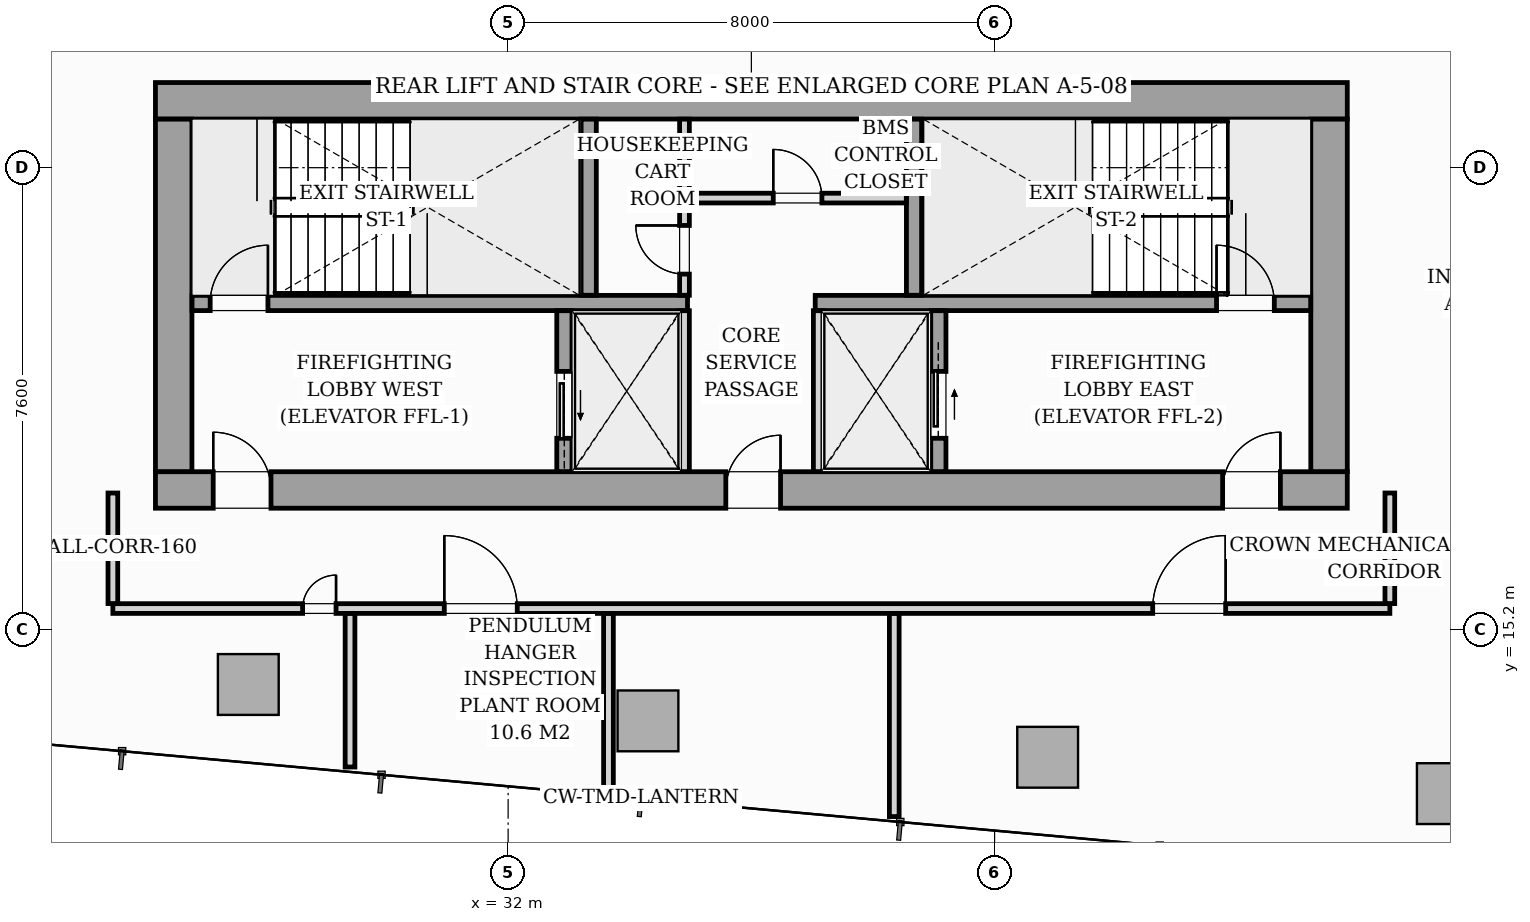
"""IFC4 building model, lengths in metres.
Left out: names, types, materials, properties, quantities, classifications, styles, units other than length and angle.
Written with IfcOpenShell. Run it as: python <this file> out.ifc"""

import sys

from ifc_helpers import new_model, si_unit, direction, frame, frame_2d, origin, origin_2d, place, context, subcontext, project, spatial, rectangle, i_section, extrude, source, transform, mapped, element, fill, save


model = new_model("IFC4")
c1 = context("Model", 3, precision=1e-05, world=origin(), true_north=direction((0.0, 1.0)))
c2 = subcontext(c1, "Body", "Model", "MODEL_VIEW")
j1 = project(units=[si_unit("LENGTHUNIT", "METRE"), si_unit("PLANEANGLEUNIT", "RADIAN")], contexts=[c1])
p1 = place(None, origin())
s1 = spatial("IfcSite", under=j1, at=p1, CompositionType="ELEMENT")
p2 = place(p1, origin())
s2 = spatial("IfcBuilding", under=s1, at=p2, CompositionType="ELEMENT")
p3 = place(p2, frame((0.0, 0.0, 270.8)))
s3 = spatial("IfcBuildingStorey", under=s2, at=p3, CompositionType="ELEMENT", Elevation=270.8)
m1 = source(origin(), c2, "Body", "SweptSolid", [
    extrude(i_section(OverallWidth=0.404, OverallDepth=0.407, WebThickness=0.027, FlangeThickness=0.044, FilletRadius=0.018, at=origin_2d()), origin(), (0.0, 0.0, 1.0), 6.496),
])
for number, where, z_axis, x_axis in (
    (1, (26.4, 17.4, 0.002), (0.0, 0.0, 1.0), (1.0, 0.0, 0.0)),
    (2, (33.12, 17.4, 0.002), (0.0, 0.0, 1.0), (1.0, 0.0, 0.0)),
    (3, (38.88, 17.4, 0.002), (0.0, 0.0, 1.0), (1.0, 0.0, 0.0)),
    (4, (45.6, 17.4, 0.002), (0.0, 0.0, 1.0), (1.0, 0.0, 0.0)),
    (5, (26.4, 24.0, 0.002), (0.0, 0.0, 1.0), (1.0, 0.0, 0.0)),
    (6, (33.12, 24.0, 0.002), (0.0, 0.0, 1.0), (1.0, 0.0, 0.0)),
    (7, (38.88, 24.0, 0.002), (0.0, 0.0, 1.0), (1.0, 0.0, 0.0)),
    (8, (45.6, 24.0, 0.002), (0.0, 0.0, 1.0), (1.0, 0.0, 0.0)),
):
    element("IfcColumn", number, at=place(p3, frame(where, z_axis=z_axis, x_axis=x_axis)), inside=s3, PredefinedType="PILASTER", context=c2, shape_type="MappedRepresentation", body=[
        mapped(m1, transform((0.0, 0.0, 0.0), scale=1.0)),
    ])
m2 = source(origin(), c2, "Body", "SweptSolid", [
    extrude(rectangle(XDim=1.0, YDim=1.0, at=origin_2d()), origin(), (0.0, 0.0, 1.0), 6.496),
])
for number, where, z_axis, x_axis in (
    (9, (27.727, 14.301, 0.002), (0.0, 0.0, 1.0), (0.996, -0.091, 0.0)),
    (10, (34.3, 13.703, 0.002), (0.0, 0.0, 1.0), (0.996, -0.091, 0.0)),
    (11, (40.873, 13.104, 0.002), (0.0, 0.0, 1.0), (0.996, -0.091, 0.0)),
    (12, (47.445, 12.506, 0.002), (0.0, 0.0, 1.0), (0.996, -0.091, 0.0)),
):
    element("IfcColumn", number, at=place(p3, frame(where, z_axis=z_axis, x_axis=x_axis)), inside=s3, PredefinedType="COLUMN", context=c2, shape_type="MappedRepresentation", body=[
        mapped(m2, transform((0.0, 0.0, 0.0), scale=1.0)),
    ])
p4 = place(p3, frame((46.541, 24.959, 0.0), z_axis=(0.0, 0.0, 1.0), x_axis=(0.995890823101, -0.090561959246, 0.0)))
e13 = element("IfcWall", 13, at=p4, inside=s3, PredefinedType="STANDARD", context=c2, shape_type="SweptSolid", body=[
    extrude(rectangle(XDim=1.679, YDim=0.26, at=frame_2d((0.84, 0.0))), origin(), (0.0, 0.0, 1.0), 6.22),
])
p5 = place(p3, frame((26.2, 17.5, 0.0), z_axis=(0.0, 0.0, 1.0), x_axis=(1.0, 0.0, 0.0)))
e14 = element("IfcWall", 14, at=p5, inside=s3, PredefinedType="SHEAR", context=c2, shape_type="SweptSolid", body=[
    extrude(rectangle(XDim=19.6, YDim=0.6, at=frame_2d((9.8, 0.0))), origin(), (0.0, 0.0, 1.0), 6.5),
])
p6 = place(p5, frame((0.95, 0.0, 0.0)))
e15 = element("IfcOpeningElement", 15, at=p6, cuts=e14, PredefinedType="OPENING", context=c2, shape_type="SweptSolid", body=[
    extrude(rectangle(XDim=0.95, YDim=2.06, at=frame_2d((0.475, 1.03))), frame((0.0, 0.31, 0.0), z_axis=(0.0, -1.0, 0.0), x_axis=(1.0, 0.0, 0.0)), (0.0, 0.0, 1.0), 0.62),
])
p7 = place(p5, frame((9.38, 0.0, 0.0)))
e16 = element("IfcOpeningElement", 16, at=p7, cuts=e14, PredefinedType="OPENING", context=c2, shape_type="SweptSolid", body=[
    extrude(rectangle(XDim=0.9, YDim=2.06, at=frame_2d((0.45, 1.03))), frame((0.0, 0.31, 0.0), z_axis=(0.0, -1.0, 0.0), x_axis=(1.0, 0.0, 0.0)), (0.0, 0.0, 1.0), 0.62),
])
p8 = place(p5, frame((17.55, 0.0, 0.0)))
e17 = element("IfcOpeningElement", 17, at=p8, cuts=e14, PredefinedType="OPENING", context=c2, shape_type="SweptSolid", body=[
    extrude(rectangle(XDim=0.95, YDim=2.06, at=frame_2d((0.475, 1.03))), frame((0.0, 0.31, 0.0), z_axis=(0.0, -1.0, 0.0), x_axis=(1.0, 0.0, 0.0)), (0.0, 0.0, 1.0), 0.62),
])
p9 = place(p3, frame((26.2, 23.9, 0.0), z_axis=(0.0, 0.0, 1.0), x_axis=(1.0, 0.0, 0.0)))
e18 = element("IfcWall", 18, at=p9, inside=s3, PredefinedType="SHEAR", context=c2, shape_type="SweptSolid", body=[
    extrude(rectangle(XDim=19.6, YDim=0.6, at=frame_2d((9.8, 0.0))), origin(), (0.0, 0.0, 1.0), 6.5),
])
for number, where, z_axis, x_axis in (
    (19, (26.5, 17.802, 0.0), (0.0, 0.0, 1.0), (0.0, 1.0, 0.0)),
    (20, (45.5, 17.802, 0.0), (0.0, 0.0, 1.0), (0.0, 1.0, 0.0)),
):
    element("IfcWall", number, at=place(p3, frame(where, z_axis=z_axis, x_axis=x_axis)), inside=s3, PredefinedType="SHEAR", context=c2, shape_type="SweptSolid", body=[
        extrude(rectangle(XDim=5.796, YDim=0.6, at=frame_2d((2.898, 0.0))), origin(), (0.0, 0.0, 1.0), 6.5),
    ])
p10 = place(p3, frame((26.802, 20.575, 0.0), z_axis=(0.0, 0.0, 1.0), x_axis=(1.0, 0.0, 0.0)))
e21 = element("IfcWall", 21, at=p10, inside=s3, PredefinedType="SOLIDWALL", context=c2, shape_type="SweptSolid", body=[
    extrude(rectangle(XDim=8.148, YDim=0.25, at=frame_2d((4.074, 0.0))), origin(), (0.0, 0.0, 1.0), 6.5),
])
p11 = place(p10, frame((0.298, 0.0, 0.0)))
e22 = element("IfcOpeningElement", 22, at=p11, cuts=e21, PredefinedType="OPENING", context=c2, shape_type="SweptSolid", body=[
    extrude(rectangle(XDim=0.95, YDim=2.06, at=frame_2d((0.475, 1.03))), frame((0.0, 0.135, 0.0), z_axis=(0.0, -1.0, 0.0), x_axis=(1.0, 0.0, 0.0)), (0.0, 0.0, 1.0), 0.27),
])
p12 = place(p3, frame((37.05, 20.575, 0.0), z_axis=(0.0, 0.0, 1.0), x_axis=(1.0, 0.0, 0.0)))
e23 = element("IfcWall", 23, at=p12, inside=s3, PredefinedType="SOLIDWALL", context=c2, shape_type="SweptSolid", body=[
    extrude(rectangle(XDim=8.148, YDim=0.25, at=frame_2d((4.074, 0.0))), origin(), (0.0, 0.0, 1.0), 6.5),
])
p13 = place(p12, frame((6.6, 0.0, 0.0)))
e24 = element("IfcOpeningElement", 24, at=p13, cuts=e23, PredefinedType="OPENING", context=c2, shape_type="SweptSolid", body=[
    extrude(rectangle(XDim=0.95, YDim=2.06, at=frame_2d((0.475, 1.03))), frame((0.0, 0.135, 0.0), z_axis=(0.0, -1.0, 0.0), x_axis=(1.0, 0.0, 0.0)), (0.0, 0.0, 1.0), 0.27),
])
for number, where, z_axis, x_axis in (
    (25, (33.325, 20.702, 0.0), (0.0, 0.0, 1.0), (0.0, 1.0, 0.0)),
    (26, (38.675, 20.702, 0.0), (0.0, 0.0, 1.0), (0.0, 1.0, 0.0)),
):
    element("IfcWall", number, at=place(p3, frame(where, z_axis=z_axis, x_axis=x_axis)), inside=s3, PredefinedType="SOLIDWALL", context=c2, shape_type="SweptSolid", body=[
        extrude(rectangle(XDim=2.896, YDim=0.25, at=frame_2d((1.448, 0.0))), origin(), (0.0, 0.0, 1.0), 6.5),
    ])
p14 = place(p3, frame((32.925, 17.802, 0.0), z_axis=(0.0, 0.0, 1.0), x_axis=(0.0, 1.0, 0.0)))
e27 = element("IfcWall", 27, at=p14, inside=s3, PredefinedType="SOLIDWALL", context=c2, shape_type="SweptSolid", body=[
    extrude(rectangle(XDim=2.646, YDim=0.25, at=frame_2d((1.323, 0.0))), origin(), (0.0, 0.0, 1.0), 6.5),
])
p15 = place(p14, frame((0.548, 0.0, 0.0)))
e28 = element("IfcOpeningElement", 28, at=p15, cuts=e27, PredefinedType="OPENING", context=c2, shape_type="SweptSolid", body=[
    extrude(rectangle(XDim=1.1, YDim=2.08, at=frame_2d((0.55, 1.04))), frame((0.0, 0.135, 0.0), z_axis=(0.0, -1.0, 0.0), x_axis=(1.0, 0.0, 0.0)), (0.0, 0.0, 1.0), 0.27),
])
for number, where, z_axis, x_axis in (
    (29, (34.9, 17.802, 0.0), (0.0, 0.0, 1.0), (0.0, 1.0, 0.0)),
    (30, (37.1, 17.802, 0.0), (0.0, 0.0, 1.0), (0.0, 1.0, 0.0)),
):
    element("IfcWall", number, at=place(p3, frame(where, z_axis=z_axis, x_axis=x_axis)), inside=s3, PredefinedType="PARTITIONING", context=c2, shape_type="SweptSolid", body=[
        extrude(rectangle(XDim=2.646, YDim=0.16, at=frame_2d((1.323, 0.0))), origin(), (0.0, 0.0, 1.0), 6.22),
    ])
p16 = place(p3, frame((39.075, 17.802, 0.0), z_axis=(0.0, 0.0, 1.0), x_axis=(0.0, 1.0, 0.0)))
e31 = element("IfcWall", 31, at=p16, inside=s3, PredefinedType="SOLIDWALL", context=c2, shape_type="SweptSolid", body=[
    extrude(rectangle(XDim=2.646, YDim=0.25, at=frame_2d((1.323, 0.0))), origin(), (0.0, 0.0, 1.0), 6.5),
])
p17 = place(p16, frame((0.548, 0.0, 0.0)))
e32 = element("IfcOpeningElement", 32, at=p17, cuts=e31, PredefinedType="OPENING", context=c2, shape_type="SweptSolid", body=[
    extrude(rectangle(XDim=1.1, YDim=2.08, at=frame_2d((0.55, 1.04))), frame((0.0, 0.135, 0.0), z_axis=(0.0, -1.0, 0.0), x_axis=(1.0, 0.0, 0.0)), (0.0, 0.0, 1.0), 0.27),
])
p18 = place(p3, frame((34.9, 20.702, 0.0), z_axis=(0.0, 0.0, 1.0), x_axis=(0.0, 1.0, 0.0)))
e33 = element("IfcWall", 33, at=p18, inside=s3, PredefinedType="PARTITIONING", context=c2, shape_type="SweptSolid", body=[
    extrude(rectangle(XDim=2.896, YDim=0.16, at=frame_2d((1.448, 0.0))), origin(), (0.0, 0.0, 1.0), 6.22),
])
p19 = place(p18, frame((0.348, 0.0, 0.0)))
e34 = element("IfcOpeningElement", 34, at=p19, cuts=e33, PredefinedType="OPENING", context=c2, shape_type="SweptSolid", body=[
    extrude(rectangle(XDim=0.8, YDim=2.05, at=frame_2d((0.4, 1.025))), frame((0.0, 0.09, 0.0), z_axis=(0.0, -1.0, 0.0), x_axis=(1.0, 0.0, 0.0)), (0.0, 0.0, 1.0), 0.18),
])
p20 = place(p3, frame((34.982, 22.3, 0.0), z_axis=(0.0, 0.0, 1.0), x_axis=(1.0, 0.0, 0.0)))
e35 = element("IfcWall", 35, at=p20, inside=s3, PredefinedType="PARTITIONING", context=c2, shape_type="SweptSolid", body=[
    extrude(rectangle(XDim=3.566, YDim=0.16, at=frame_2d((1.783, 0.0))), origin(), (0.0, 0.0, 1.0), 6.22),
])
p21 = place(p20, frame((1.378, 0.0, 0.0)))
e36 = element("IfcOpeningElement", 36, at=p21, cuts=e35, PredefinedType="OPENING", context=c2, shape_type="SweptSolid", body=[
    extrude(rectangle(XDim=0.8, YDim=2.05, at=frame_2d((0.4, 1.025))), frame((0.0, 0.09, 0.0), z_axis=(0.0, -1.0, 0.0), x_axis=(1.0, 0.0, 0.0)), (0.0, 0.0, 1.0), 0.18),
])
p22 = place(p3, frame((25.5, 15.55, 0.0), z_axis=(0.0, 0.0, 1.0), x_axis=(1.0, 0.0, 0.0)))
e37 = element("IfcWall", 37, at=p22, inside=s3, PredefinedType="PARTITIONING", context=c2, shape_type="SweptSolid", body=[
    extrude(rectangle(XDim=21.0, YDim=0.16, at=frame_2d((10.5, 0.0))), origin(), (0.0, 0.0, 1.0), 5.785),
])
p23 = place(p22, frame((3.12, 0.0, 0.0)))
e38 = element("IfcOpeningElement", 38, at=p23, cuts=e37, PredefinedType="OPENING", context=c2, shape_type="SweptSolid", body=[
    extrude(rectangle(XDim=0.55, YDim=2.02, at=frame_2d((0.275, 1.01))), frame((0.0, 0.09, 0.0), z_axis=(0.0, -1.0, 0.0), x_axis=(1.0, 0.0, 0.0)), (0.0, 0.0, 1.0), 0.18),
])
p24 = place(p22, frame((5.45, 0.0, 0.0)))
e39 = element("IfcOpeningElement", 39, at=p24, cuts=e37, PredefinedType="OPENING", context=c2, shape_type="SweptSolid", body=[
    extrude(rectangle(XDim=1.2, YDim=2.08, at=frame_2d((0.6, 1.04))), frame((0.0, 0.09, 0.0), z_axis=(0.0, -1.0, 0.0), x_axis=(1.0, 0.0, 0.0)), (0.0, 0.0, 1.0), 0.18),
])
p25 = place(p22, frame((17.1, 0.0, 0.0)))
e40 = element("IfcOpeningElement", 40, at=p25, cuts=e37, PredefinedType="OPENING", context=c2, shape_type="SweptSolid", body=[
    extrude(rectangle(XDim=1.2, YDim=2.08, at=frame_2d((0.6, 1.04))), frame((0.0, 0.09, 0.0), z_axis=(0.0, -1.0, 0.0), x_axis=(1.0, 0.0, 0.0)), (0.0, 0.0, 1.0), 0.18),
])
for number, where, z_axis, x_axis in (
    (41, (25.5, 15.632, 0.0), (0.0, 0.0, 1.0), (0.0, 1.0, 0.0)),
    (42, (46.5, 15.632, 0.0), (0.0, 0.0, 1.0), (0.0, 1.0, 0.0)),
):
    element("IfcWall", number, at=place(p3, frame(where, z_axis=z_axis, x_axis=x_axis)), inside=s3, PredefinedType="PARTITIONING", context=c2, shape_type="SweptSolid", body=[
        extrude(rectangle(XDim=1.818, YDim=0.16, at=frame_2d((0.909, 0.0))), origin(), (0.0, 0.0, 1.0), 6.22),
    ])
p26 = place(p3, frame((29.4, 12.944, 0.0), z_axis=(0.0, 0.0, 1.0), x_axis=(0.0, 1.0, 0.0)))
e43 = element("IfcWall", 43, at=p26, inside=s3, PredefinedType="PARTITIONING", context=c2, shape_type="SweptSolid", body=[
    extrude(rectangle(XDim=2.524, YDim=0.16, at=frame_2d((1.262, 0.0))), origin(), (0.0, 0.0, 1.0), 6.22),
])
p27 = place(p3, frame((38.35, 12.129, 0.0), z_axis=(0.0, 0.0, 1.0), x_axis=(0.0, 1.0, 0.0)))
e44 = element("IfcWall", 44, at=p27, inside=s3, PredefinedType="PARTITIONING", context=c2, shape_type="SweptSolid", body=[
    extrude(rectangle(XDim=3.339, YDim=0.16, at=frame_2d((1.669, 0.0))), origin(), (0.0, 0.0, 1.0), 6.22),
])
p28 = place(p3, frame((33.65, 12.557, 0.0), z_axis=(0.0, 0.0, 1.0), x_axis=(0.0, 1.0, 0.0)))
e45 = element("IfcWall", 45, at=p28, inside=s3, PredefinedType="PARTITIONING", context=c2, shape_type="SweptSolid", body=[
    extrude(rectangle(XDim=2.911, YDim=0.16, at=frame_2d((1.456, 0.0))), origin(), (0.0, 0.0, 1.0), 6.22),
])
m3 = source(origin(), c2, "Body", "SweptSolid", [
    extrude(rectangle(XDim=0.95, YDim=2.06, at=frame_2d((0.475, 1.03))), frame((0.0, 0.025, 0.0), z_axis=(0.0, -1.0, 0.0), x_axis=(1.0, 0.0, 0.0)), (0.0, 0.0, 1.0), 0.05),
])
p29 = place(p6, origin())
e46 = element("IfcDoor", 46, at=p29, inside=s3, OperationType="SINGLE_SWING_LEFT", PredefinedType="DOOR", context=c2, shape_type="MappedRepresentation", body=[
    mapped(m3, transform((0.0, 0.0, 0.0), scale=1.0)),
])
fill(e15, e46)
m4 = source(origin(), c2, "Body", "SweptSolid", [
    extrude(rectangle(XDim=0.9, YDim=2.06, at=frame_2d((0.45, 1.03))), frame((0.0, 0.025, 0.0), z_axis=(0.0, -1.0, 0.0), x_axis=(1.0, 0.0, 0.0)), (0.0, 0.0, 1.0), 0.05),
])
p30 = place(p7, origin())
e47 = element("IfcDoor", 47, at=p30, inside=s3, OperationType="SINGLE_SWING_RIGHT", PredefinedType="DOOR", context=c2, shape_type="MappedRepresentation", body=[
    mapped(m4, transform((0.0, 0.0, 0.0), scale=1.0)),
])
fill(e16, e47)
p31 = place(p8, origin())
e48 = element("IfcDoor", 48, at=p31, inside=s3, OperationType="SINGLE_SWING_RIGHT", PredefinedType="DOOR", context=c2, shape_type="MappedRepresentation", body=[
    mapped(m3, transform((0.0, 0.0, 0.0), scale=1.0)),
])
fill(e17, e48)
p32 = place(p11, origin())
e49 = element("IfcDoor", 49, at=p32, inside=s3, OperationType="SINGLE_SWING_RIGHT", PredefinedType="DOOR", context=c2, shape_type="MappedRepresentation", body=[
    mapped(m3, transform((0.0, 0.0, 0.0), scale=1.0)),
])
fill(e22, e49)
p33 = place(p13, origin())
e50 = element("IfcDoor", 50, at=p33, inside=s3, OperationType="SINGLE_SWING_LEFT", PredefinedType="DOOR", context=c2, shape_type="MappedRepresentation", body=[
    mapped(m3, transform((0.0, 0.0, 0.0), scale=1.0)),
])
fill(e24, e50)
m5 = source(origin(), c2, "Body", "SweptSolid", [
    extrude(rectangle(XDim=1.1, YDim=2.08, at=frame_2d((0.55, 1.04))), frame((0.0, 0.025, 0.0), z_axis=(0.0, -1.0, 0.0), x_axis=(1.0, 0.0, 0.0)), (0.0, 0.0, 1.0), 0.05),
])
p34 = place(p15, origin())
e51 = element("IfcDoor", 51, at=p34, inside=s3, OperationType="SLIDING_TO_LEFT", PredefinedType="DOOR", context=c2, shape_type="MappedRepresentation", body=[
    mapped(m5, transform((0.0, 0.0, 0.0), scale=1.0)),
])
fill(e28, e51)
p35 = place(p17, origin())
e52 = element("IfcDoor", 52, at=p35, inside=s3, OperationType="SLIDING_TO_RIGHT", PredefinedType="DOOR", context=c2, shape_type="MappedRepresentation", body=[
    mapped(m5, transform((0.0, 0.0, 0.0), scale=1.0)),
])
fill(e32, e52)
m6 = source(origin(), c2, "Body", "SweptSolid", [
    extrude(rectangle(XDim=0.8, YDim=2.05, at=frame_2d((0.4, 1.025))), frame((0.0, 0.025, 0.0), z_axis=(0.0, -1.0, 0.0), x_axis=(1.0, 0.0, 0.0)), (0.0, 0.0, 1.0), 0.05),
])
p36 = place(p19, origin())
e53 = element("IfcDoor", 53, at=p36, inside=s3, OperationType="SINGLE_SWING_RIGHT", PredefinedType="DOOR", context=c2, shape_type="MappedRepresentation", body=[
    mapped(m6, transform((0.0, 0.0, 0.0), scale=1.0)),
])
fill(e34, e53)
p37 = place(p21, origin())
e54 = element("IfcDoor", 54, at=p37, inside=s3, OperationType="SINGLE_SWING_LEFT", PredefinedType="DOOR", context=c2, shape_type="MappedRepresentation", body=[
    mapped(m6, transform((0.0, 0.0, 0.0), scale=1.0)),
])
fill(e36, e54)
m7 = source(origin(), c2, "Body", "SweptSolid", [
    extrude(rectangle(XDim=0.55, YDim=2.02, at=frame_2d((0.275, 1.01))), frame((0.0, 0.025, 0.0), z_axis=(0.0, -1.0, 0.0), x_axis=(1.0, 0.0, 0.0)), (0.0, 0.0, 1.0), 0.05),
])
p38 = place(p23, origin())
e55 = element("IfcDoor", 55, at=p38, inside=s3, OperationType="SINGLE_SWING_RIGHT", PredefinedType="DOOR", context=c2, shape_type="MappedRepresentation", body=[
    mapped(m7, transform((0.0, 0.0, 0.0), scale=1.0)),
])
fill(e38, e55)
m8 = source(origin(), c2, "Body", "SweptSolid", [
    extrude(rectangle(XDim=1.2, YDim=2.08, at=frame_2d((0.6, 1.04))), frame((0.0, 0.025, 0.0), z_axis=(0.0, -1.0, 0.0), x_axis=(1.0, 0.0, 0.0)), (0.0, 0.0, 1.0), 0.05),
])
p39 = place(p24, origin())
e56 = element("IfcDoor", 56, at=p39, inside=s3, OperationType="SINGLE_SWING_LEFT", PredefinedType="DOOR", context=c2, shape_type="MappedRepresentation", body=[
    mapped(m8, transform((0.0, 0.0, 0.0), scale=1.0)),
])
fill(e39, e56)
p40 = place(p25, origin())
e57 = element("IfcDoor", 57, at=p40, inside=s3, OperationType="SINGLE_SWING_RIGHT", PredefinedType="DOOR", context=c2, shape_type="MappedRepresentation", body=[
    mapped(m8, transform((0.0, 0.0, 0.0), scale=1.0)),
])
fill(e40, e57)
save(model, sys.argv[1])
